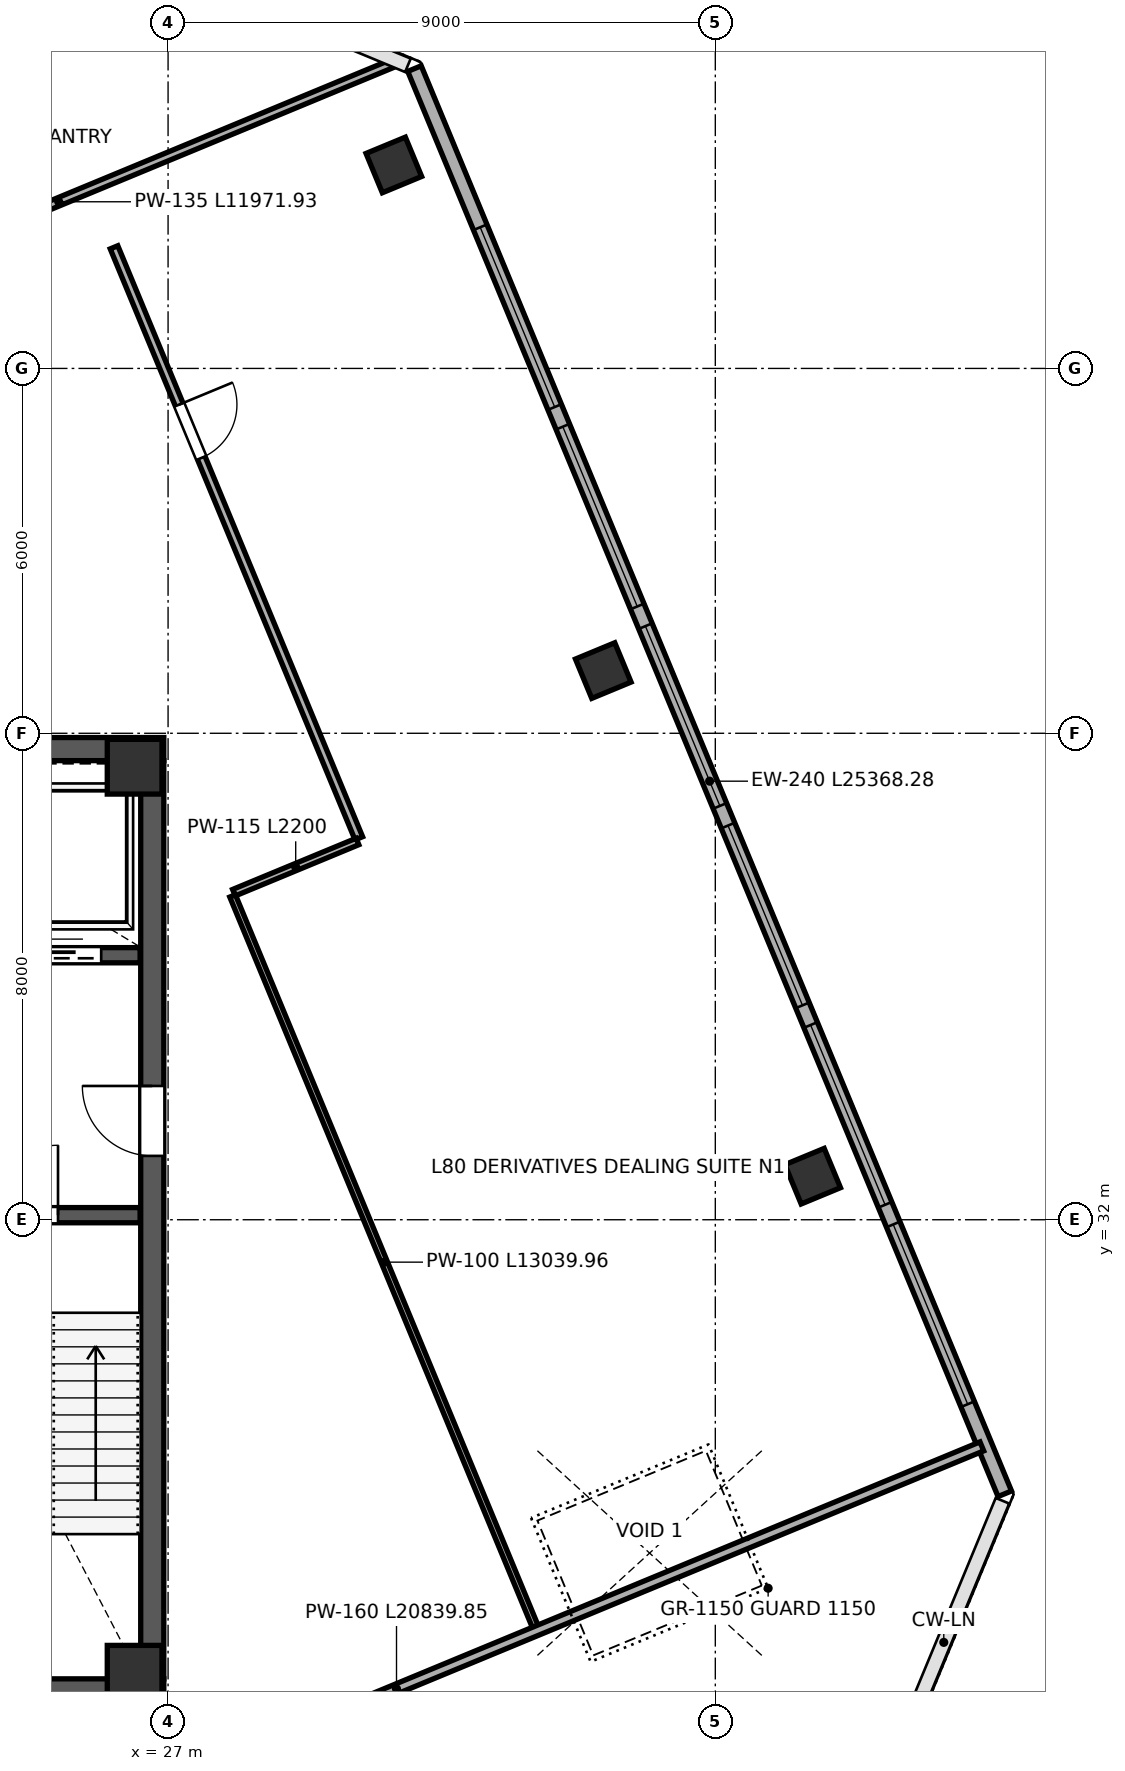
"""IFC4 building model, lengths in metres.
Left out: names, types, materials, properties, quantities, classifications, styles, units other than length and angle.
Written with IfcOpenShell. Run it as: python <this file> out.ifc"""

import sys

from ifc_helpers import new_model, si_unit, direction, frame, frame_2d, origin, origin_2d, place, context, subcontext, project, spatial, rectangle, extrude, source, transform, mapped, element, fill, save


model = new_model("IFC4")
c1 = context("Model", 3, precision=1e-05, world=origin(), true_north=direction((0.0, 1.0)))
c2 = subcontext(c1, "Body", "Model", "MODEL_VIEW")
j1 = project(units=[si_unit("LENGTHUNIT", "METRE"), si_unit("PLANEANGLEUNIT", "RADIAN")], contexts=[c1])
p1 = place(None, origin())
s1 = spatial("IfcSite", under=j1, at=p1, CompositionType="ELEMENT")
p2 = place(p1, origin())
s2 = spatial("IfcBuilding", under=s1, at=p2, CompositionType="ELEMENT")
p3 = place(p2, frame((0.0, 0.0, 355.2)))
s3 = spatial("IfcBuildingStorey", under=s2, at=p3, CompositionType="ELEMENT", Elevation=355.2)
m1 = source(origin(), c2, "Body", "SweptSolid", [
    extrude(rectangle(XDim=0.9, YDim=0.9, at=origin_2d()), origin(), (0.0, 0.0, 1.0), 4.799),
])
for number, where, z_axis, x_axis in (
    (1, (26.45, 24.55, 0.001), (0.0, 0.0, 1.0), (1.0, 0.0, 0.0)),
    (2, (26.45, 39.45, 0.001), (0.0, 0.0, 1.0), (1.0, 0.0, 0.0)),
):
    element("IfcColumn", number, at=place(p3, frame(where, z_axis=z_axis, x_axis=x_axis)), inside=s3, PredefinedType="COLUMN", context=c2, shape_type="MappedRepresentation", body=[
        mapped(m1, transform((0.0, 0.0, 0.0), scale=1.0)),
    ])
m2 = source(origin(), c2, "Body", "SweptSolid", [
    extrude(rectangle(XDim=0.7, YDim=0.7, at=origin_2d()), origin(), (0.0, 0.0, 1.0), 4.799),
])
for number, where, z_axis, x_axis in (
    (3, (30.713, 49.346, 0.001), (0.0, 0.0, 1.0), (-0.383, 0.924, 0.0)),
    (4, (34.157, 41.031, 0.001), (0.0, 0.0, 1.0), (-0.383, 0.924, 0.0)),
    (5, (37.602, 32.716, 0.001), (0.0, 0.0, 1.0), (-0.383, 0.924, 0.0)),
):
    element("IfcColumn", number, at=place(p3, frame(where, z_axis=z_axis, x_axis=x_axis)), inside=s3, PredefinedType="COLUMN", context=c2, shape_type="MappedRepresentation", body=[
        mapped(m2, transform((0.0, 0.0, 0.0), scale=1.0)),
    ])
p4 = place(p3, frame((40.761, 27.494, 0.0), z_axis=(0.0, 0.0, 1.0), x_axis=(-0.382690925775, 0.923876428604, 0.0)))
e6 = element("IfcWall", 6, at=p4, inside=s3, PredefinedType="SOLIDWALL", context=c2, shape_type="SweptSolid", body=[
    extrude(rectangle(XDim=25.368, YDim=0.24, at=frame_2d((12.684, 0.0))), origin(), (0.0, 0.0, 1.0), 4.52),
])
p5 = place(p4, frame((1.594, 0.0, 0.45)))
e7 = element("IfcOpeningElement", 7, at=p5, cuts=e6, PredefinedType="OPENING", context=c2, shape_type="SweptSolid", body=[
    extrude(rectangle(XDim=3.2, YDim=2.5, at=frame_2d((1.6, 1.25))), frame((0.0, 0.13, 0.0), z_axis=(0.0, -1.0, 0.0), x_axis=(1.0, 0.0, 0.0)), (0.0, 0.0, 1.0), 0.26),
])
p6 = place(p4, frame((5.144, 0.0, 0.45)))
e8 = element("IfcOpeningElement", 8, at=p6, cuts=e6, PredefinedType="OPENING", context=c2, shape_type="SweptSolid", body=[
    extrude(rectangle(XDim=3.2, YDim=2.5, at=frame_2d((1.6, 1.25))), frame((0.0, 0.13, 0.0), z_axis=(0.0, -1.0, 0.0), x_axis=(1.0, 0.0, 0.0)), (0.0, 0.0, 1.0), 0.26),
])
p7 = place(p4, frame((8.694, 0.0, 0.45)))
e9 = element("IfcOpeningElement", 9, at=p7, cuts=e6, PredefinedType="OPENING", context=c2, shape_type="SweptSolid", body=[
    extrude(rectangle(XDim=3.2, YDim=2.5, at=frame_2d((1.6, 1.25))), frame((0.0, 0.13, 0.0), z_axis=(0.0, -1.0, 0.0), x_axis=(1.0, 0.0, 0.0)), (0.0, 0.0, 1.0), 0.26),
])
p8 = place(p4, frame((12.244, 0.0, 0.45)))
e10 = element("IfcOpeningElement", 10, at=p8, cuts=e6, PredefinedType="OPENING", context=c2, shape_type="SweptSolid", body=[
    extrude(rectangle(XDim=3.2, YDim=2.5, at=frame_2d((1.6, 1.25))), frame((0.0, 0.13, 0.0), z_axis=(0.0, -1.0, 0.0), x_axis=(1.0, 0.0, 0.0)), (0.0, 0.0, 1.0), 0.26),
])
p9 = place(p4, frame((15.794, 0.0, 0.45)))
e11 = element("IfcOpeningElement", 11, at=p9, cuts=e6, PredefinedType="OPENING", context=c2, shape_type="SweptSolid", body=[
    extrude(rectangle(XDim=3.2, YDim=2.5, at=frame_2d((1.6, 1.25))), frame((0.0, 0.13, 0.0), z_axis=(0.0, -1.0, 0.0), x_axis=(1.0, 0.0, 0.0)), (0.0, 0.0, 1.0), 0.26),
])
p10 = place(p4, frame((19.344, 0.0, 0.45)))
e12 = element("IfcOpeningElement", 12, at=p10, cuts=e6, PredefinedType="OPENING", context=c2, shape_type="SweptSolid", body=[
    extrude(rectangle(XDim=3.2, YDim=2.5, at=frame_2d((1.6, 1.25))), frame((0.0, 0.13, 0.0), z_axis=(0.0, -1.0, 0.0), x_axis=(1.0, 0.0, 0.0)), (0.0, 0.0, 1.0), 0.26),
])
p11 = place(p3, frame((26.171, 52.953, 0.0), z_axis=(0.0, 0.0, 1.0), x_axis=(-0.923878251708, -0.382686524484, 0.0)))
e13 = element("IfcWall", 13, at=p11, inside=s3, PredefinedType="SOLIDWALL", context=c2, shape_type="SweptSolid", body=[
    extrude(rectangle(XDim=26.668, YDim=0.24, at=frame_2d((13.334, 0.0))), origin(), (0.0, 0.0, 1.0), 4.52),
])
p12 = place(p11, frame((13.454, 0.0, 0.45)))
e14 = element("IfcOpeningElement", 14, at=p12, cuts=e13, PredefinedType="OPENING", context=c2, shape_type="SweptSolid", body=[
    extrude(rectangle(XDim=3.2, YDim=2.5, at=frame_2d((1.6, 1.25))), frame((0.0, 0.13, 0.0), z_axis=(0.0, -1.0, 0.0), x_axis=(1.0, 0.0, 0.0)), (0.0, 0.0, 1.0), 0.26),
])
p13 = place(p11, frame((21.304, 0.0, 0.45)))
e15 = element("IfcOpeningElement", 15, at=p13, cuts=e13, PredefinedType="OPENING", context=c2, shape_type="SweptSolid", body=[
    extrude(rectangle(XDim=3.2, YDim=2.5, at=frame_2d((1.6, 1.25))), frame((0.0, 0.13, 0.0), z_axis=(0.0, -1.0, 0.0), x_axis=(1.0, 0.0, 0.0)), (0.0, 0.0, 1.0), 0.26),
])
p14 = place(p3, frame((26.74, 24.45, 0.0), z_axis=(0.0, 0.0, 1.0), x_axis=(0.0, 1.0, 0.0)))
e16 = element("IfcWall", 16, at=p14, inside=s3, PredefinedType="SHEAR", context=c2, shape_type="SweptSolid", body=[
    extrude(rectangle(XDim=15.1, YDim=0.38, at=frame_2d((7.55, 0.0))), origin(), (0.0, 0.0, 1.0), 4.52),
])
p15 = place(p14, frame((8.6, 0.0, 0.0)))
e17 = element("IfcOpeningElement", 17, at=p15, cuts=e16, PredefinedType="OPENING", context=c2, shape_type="SweptSolid", body=[
    extrude(rectangle(XDim=1.15, YDim=2.2, at=frame_2d((0.575, 1.1))), frame((0.0, 0.2, 0.0), z_axis=(0.0, -1.0, 0.0), x_axis=(1.0, 0.0, 0.0)), (0.0, 0.0, 1.0), 0.4),
])
for number, where, z_axis, x_axis in (
    (18, (9.07, 24.26, 0.0), (0.0, 0.0, 1.0), (1.0, 0.0, 0.0)),
    (19, (9.07, 39.74, 0.0), (0.0, 0.0, 1.0), (1.0, 0.0, 0.0)),
):
    element("IfcWall", number, at=place(p3, frame(where, z_axis=z_axis, x_axis=x_axis)), inside=s3, PredefinedType="SHEAR", context=c2, shape_type="SweptSolid", body=[
        extrude(rectangle(XDim=17.86, YDim=0.38, at=frame_2d((8.93, 0.0))), origin(), (0.0, 0.0, 1.0), 4.52),
    ])
p16 = place(p3, frame((23.19, 32.075, 0.0), z_axis=(0.0, 0.0, 1.0), x_axis=(1.0, 0.0, 0.0)))
e20 = element("IfcWall", 20, at=p16, inside=s3, PredefinedType="SHEAR", context=c2, shape_type="SweptSolid", body=[
    extrude(rectangle(XDim=3.35, YDim=0.25, at=frame_2d((1.675, 0.0))), origin(), (0.0, 0.0, 1.0), 4.52),
])
p17 = place(p16, frame((0.85, 0.0, 0.0)))
e21 = element("IfcOpeningElement", 21, at=p17, cuts=e20, PredefinedType="OPENING", context=c2, shape_type="SweptSolid", body=[
    extrude(rectangle(XDim=1.15, YDim=2.2, at=frame_2d((0.575, 1.1))), frame((0.0, 0.135, 0.0), z_axis=(0.0, -1.0, 0.0), x_axis=(1.0, 0.0, 0.0)), (0.0, 0.0, 1.0), 0.27),
])
p18 = place(p3, frame((21.45, 36.35, 0.0), z_axis=(0.0, 0.0, 1.0), x_axis=(1.0, 0.0, 0.0)))
e22 = element("IfcWall", 22, at=p18, inside=s3, PredefinedType="SHEAR", context=c2, shape_type="SweptSolid", body=[
    extrude(rectangle(XDim=5.09, YDim=0.25, at=frame_2d((2.545, 0.0))), origin(), (0.0, 0.0, 1.0), 4.52),
])
p19 = place(p18, frame((0.7, 0.0, 0.0)))
e23 = element("IfcOpeningElement", 23, at=p19, cuts=e22, PredefinedType="OPENING", context=c2, shape_type="SweptSolid", body=[
    extrude(rectangle(XDim=1.2, YDim=2.2, at=frame_2d((0.6, 1.1))), frame((0.0, 0.135, 0.0), z_axis=(0.0, -1.0, 0.0), x_axis=(1.0, 0.0, 0.0)), (0.0, 0.0, 1.0), 0.27),
])
p20 = place(p18, frame((3.25, 0.0, 0.0)))
e24 = element("IfcOpeningElement", 24, at=p20, cuts=e22, PredefinedType="OPENING", context=c2, shape_type="SweptSolid", body=[
    extrude(rectangle(XDim=1.2, YDim=2.2, at=frame_2d((0.6, 1.1))), frame((0.0, 0.135, 0.0), z_axis=(0.0, -1.0, 0.0), x_axis=(1.0, 0.0, 0.0)), (0.0, 0.0, 1.0), 0.27),
])
p21 = place(p3, frame((26.111, 47.992, 0.0), z_axis=(0.0, 0.0, 1.0), x_axis=(0.382686563741, -0.923878235447, 0.0)))
e25 = element("IfcWall", 25, at=p21, inside=s3, PredefinedType="PARTITIONING", context=c2, shape_type="SweptSolid", body=[
    extrude(rectangle(XDim=10.52, YDim=0.135, at=frame_2d((5.26, 0.0))), origin(), (0.0, 0.0, 1.0), 4.52),
])
p22 = place(p21, frame((2.8, 0.0, 0.0)))
e26 = element("IfcOpeningElement", 26, at=p22, cuts=e25, PredefinedType="OPENING", context=c2, shape_type="SweptSolid", body=[
    extrude(rectangle(XDim=0.95, YDim=2.15, at=frame_2d((0.475, 1.075))), frame((0.0, 0.078, 0.0), z_axis=(0.0, -1.0, 0.0), x_axis=(1.0, 0.0, 0.0)), (0.0, 0.0, 1.0), 0.155),
])
p23 = place(p3, frame((28.083, 37.378, 0.0), z_axis=(0.0, 0.0, 1.0), x_axis=(0.923853160736, 0.382747093259, 0.0)))
e27 = element("IfcWall", 27, at=p23, inside=s3, PredefinedType="PARTITIONING", context=c2, shape_type="SweptSolid", body=[
    extrude(rectangle(XDim=2.2, YDim=0.115, at=frame_2d((1.1, 0.0))), origin(), (0.0, 0.0, 1.0), 4.52),
])
p24 = place(p3, frame((28.061, 37.326, 0.0), z_axis=(0.0, 0.0, 1.0), x_axis=(0.382702889353, -0.923871472923, 0.0)))
e28 = element("IfcWall", 28, at=p24, inside=s3, PredefinedType="PARTITIONING", context=c2, shape_type="SweptSolid", body=[
    extrude(rectangle(XDim=13.04, YDim=0.1, at=frame_2d((6.52, 0.0))), origin(), (0.0, 0.0, 1.0), 4.52),
])
p25 = place(p3, frame((19.671, 46.45, 0.0), z_axis=(0.0, 0.0, 1.0), x_axis=(0.923879139167, 0.38268438198, 0.0)))
e29 = element("IfcWall", 29, at=p25, inside=s3, PredefinedType="PARTITIONING", context=c2, shape_type="SweptSolid", body=[
    extrude(rectangle(XDim=11.972, YDim=0.135, at=frame_2d((5.986, 0.0))), origin(), (0.0, 0.0, 1.0), 4.52),
])
p26 = place(p3, frame((21.13, 20.298, 0.0), z_axis=(0.0, 0.0, 1.0), x_axis=(0.923880046805, 0.382682190748, 0.0)))
e30 = element("IfcWall", 30, at=p26, inside=s3, PredefinedType="PARTITIONING", context=c2, shape_type="SweptSolid", body=[
    extrude(rectangle(XDim=20.84, YDim=0.16, at=frame_2d((10.42, 0.0))), origin(), (0.0, 0.0, 1.0), 4.52),
])
m3 = source(origin(), c2, "Body", "SweptSolid", [
    extrude(rectangle(XDim=3.2, YDim=2.5, at=frame_2d((1.6, 1.25))), frame((0.0, 0.03, 0.0), z_axis=(0.0, -1.0, 0.0), x_axis=(1.0, 0.0, 0.0)), (0.0, 0.0, 1.0), 0.06),
])
p27 = place(p5, origin())
e31 = element("IfcWindow", 31, at=p27, inside=s3, PartitioningType="TRIPLE_PANEL_VERTICAL", PredefinedType="WINDOW", context=c2, shape_type="MappedRepresentation", body=[
    mapped(m3, transform((0.0, 0.0, 0.0), scale=1.0)),
])
fill(e7, e31)
p28 = place(p6, origin())
e32 = element("IfcWindow", 32, at=p28, inside=s3, PartitioningType="TRIPLE_PANEL_VERTICAL", PredefinedType="WINDOW", context=c2, shape_type="MappedRepresentation", body=[
    mapped(m3, transform((0.0, 0.0, 0.0), scale=1.0)),
])
fill(e8, e32)
p29 = place(p7, origin())
e33 = element("IfcWindow", 33, at=p29, inside=s3, PartitioningType="TRIPLE_PANEL_VERTICAL", PredefinedType="WINDOW", context=c2, shape_type="MappedRepresentation", body=[
    mapped(m3, transform((0.0, 0.0, 0.0), scale=1.0)),
])
fill(e9, e33)
p30 = place(p8, origin())
e34 = element("IfcWindow", 34, at=p30, inside=s3, PartitioningType="TRIPLE_PANEL_VERTICAL", PredefinedType="WINDOW", context=c2, shape_type="MappedRepresentation", body=[
    mapped(m3, transform((0.0, 0.0, 0.0), scale=1.0)),
])
fill(e10, e34)
p31 = place(p9, origin())
e35 = element("IfcWindow", 35, at=p31, inside=s3, PartitioningType="TRIPLE_PANEL_VERTICAL", PredefinedType="WINDOW", context=c2, shape_type="MappedRepresentation", body=[
    mapped(m3, transform((0.0, 0.0, 0.0), scale=1.0)),
])
fill(e11, e35)
p32 = place(p10, origin())
e36 = element("IfcWindow", 36, at=p32, inside=s3, PartitioningType="TRIPLE_PANEL_VERTICAL", PredefinedType="WINDOW", context=c2, shape_type="MappedRepresentation", body=[
    mapped(m3, transform((0.0, 0.0, 0.0), scale=1.0)),
])
fill(e12, e36)
m4 = source(origin(), c2, "Body", "SweptSolid", [
    extrude(rectangle(XDim=1.15, YDim=2.2, at=frame_2d((0.575, 1.1))), frame((0.0, 0.025, 0.0), z_axis=(0.0, -1.0, 0.0), x_axis=(1.0, 0.0, 0.0)), (0.0, 0.0, 1.0), 0.05),
])
p33 = place(p17, origin())
e37 = element("IfcDoor", 37, at=p33, inside=s3, OperationType="SINGLE_SWING_RIGHT", PredefinedType="DOOR", context=c2, shape_type="MappedRepresentation", body=[
    mapped(m4, transform((0.0, 0.0, 0.0), scale=1.0)),
])
fill(e21, e37)
m5 = source(origin(), c2, "Body", "SweptSolid", [
    extrude(rectangle(XDim=1.15, YDim=2.2, at=frame_2d((0.575, 1.1))), frame((0.0, 0.025, 0.0), z_axis=(0.0, -1.0, 0.0), x_axis=(1.0, 0.0, 0.0)), (0.0, 0.0, 1.0), 0.05),
])
p34 = place(p15, origin())
e38 = element("IfcDoor", 38, at=p34, inside=s3, OperationType="SINGLE_SWING_RIGHT", PredefinedType="DOOR", context=c2, shape_type="MappedRepresentation", body=[
    mapped(m5, transform((0.0, 0.0, 0.0), scale=1.0)),
])
fill(e17, e38)
m6 = source(origin(), c2, "Body", "SweptSolid", [
    extrude(rectangle(XDim=1.2, YDim=2.2, at=frame_2d((0.6, 1.1))), frame((0.0, 0.025, 0.0), z_axis=(0.0, -1.0, 0.0), x_axis=(1.0, 0.0, 0.0)), (0.0, 0.0, 1.0), 0.05),
])
p35 = place(p20, origin())
e39 = element("IfcDoor", 39, at=p35, inside=s3, OperationType="SLIDING_TO_RIGHT", PredefinedType="DOOR", context=c2, shape_type="MappedRepresentation", body=[
    mapped(m6, transform((0.0, 0.0, 0.0), scale=1.0)),
])
fill(e24, e39)
m7 = source(origin(), c2, "Body", "SweptSolid", [
    extrude(rectangle(XDim=0.95, YDim=2.15, at=frame_2d((0.475, 1.075))), frame((0.0, 0.025, 0.0), z_axis=(0.0, -1.0, 0.0), x_axis=(1.0, 0.0, 0.0)), (0.0, 0.0, 1.0), 0.05),
])
p36 = place(p22, origin())
e40 = element("IfcDoor", 40, at=p36, inside=s3, OperationType="SINGLE_SWING_LEFT", PredefinedType="DOOR", context=c2, shape_type="MappedRepresentation", body=[
    mapped(m7, transform((0.0, 0.0, 0.0), scale=1.0)),
])
fill(e26, e40)
save(model, sys.argv[1])
